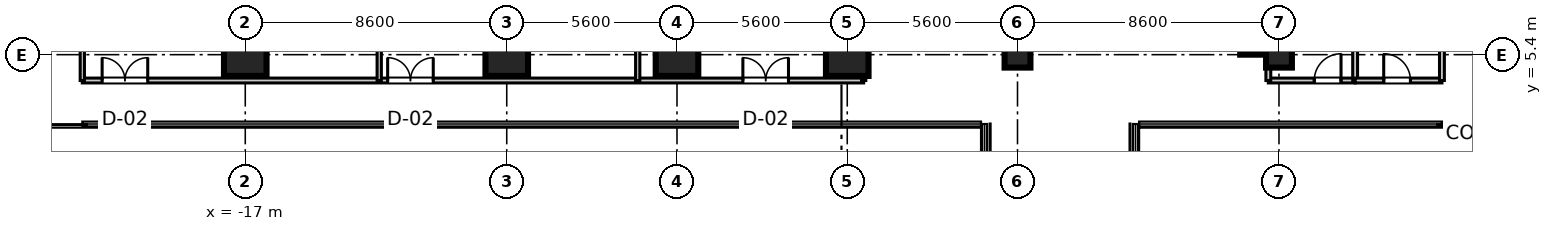
"""IFC4 building model, lengths in metres.
Left out: names, types, materials, properties, quantities, classifications, styles, units other than length and angle.
Written with IfcOpenShell. Run it as: python <this file> out.ifc"""

import sys

from ifc_helpers import new_model, si_unit, direction, frame, frame_2d, origin, origin_2d, place, context, subcontext, project, spatial, rectangle, extrude, source, transform, mapped, element, fill, save


model = new_model("IFC4")
c1 = context("Model", 3, precision=1e-05, world=origin(), true_north=direction((0.0, 1.0)))
c2 = subcontext(c1, "Body", "Model", "MODEL_VIEW")
j1 = project(units=[si_unit("LENGTHUNIT", "METRE"), si_unit("PLANEANGLEUNIT", "RADIAN")], contexts=[c1])
p1 = place(None, origin())
s1 = spatial("IfcSite", under=j1, at=p1, CompositionType="ELEMENT")
p2 = place(p1, origin())
s2 = spatial("IfcBuilding", under=s1, at=p2, CompositionType="ELEMENT")
p3 = place(p2, frame((0.0, 0.0, 68.9)))
s3 = spatial("IfcBuildingStorey", under=s2, at=p3, CompositionType="ELEMENT", Elevation=68.9)
m1 = source(origin(), c2, "Body", "SweptSolid", [
    extrude(rectangle(XDim=1.4, YDim=1.4, at=origin_2d()), origin(), (0.0, 0.0, 1.0), 3.605),
])
for number, where, z_axis, x_axis in (
    (1, (-17.0, 5.4, 0.0), (0.0, 0.0, 1.0), (1.0, 0.0, 0.0)),
    (2, (-8.4, 5.4, 0.0), (0.0, 0.0, 1.0), (1.0, 0.0, 0.0)),
    (3, (-2.8, 5.4, 0.0), (0.0, 0.0, 1.0), (1.0, 0.0, 0.0)),
    (4, (2.8, 5.4, 0.0), (0.0, 0.0, 1.0), (1.0, 0.0, 0.0)),
):
    element("IfcColumn", number, at=place(p3, frame(where, z_axis=z_axis, x_axis=x_axis)), inside=s3, PredefinedType="COLUMN", context=c2, shape_type="MappedRepresentation", body=[
        mapped(m1, transform((0.0, 0.0, 0.0), scale=1.0)),
    ])
m2 = source(origin(), c2, "Body", "SweptSolid", [
    extrude(rectangle(XDim=0.85, YDim=0.85, at=origin_2d()), origin(), (0.0, 0.0, 1.0), 3.605),
])
for number, where, z_axis, x_axis in (
    (5, (8.4, 5.4, 0.0), (0.0, 0.0, 1.0), (1.0, 0.0, 0.0)),
    (6, (17.0, 5.4, 0.0), (0.0, 0.0, 1.0), (1.0, 0.0, 0.0)),
):
    element("IfcColumn", number, at=place(p3, frame(where, z_axis=z_axis, x_axis=x_axis)), inside=s3, PredefinedType="PILASTER", context=c2, shape_type="MappedRepresentation", body=[
        mapped(m2, transform((0.0, 0.0, 0.0), scale=1.0)),
    ])
m3 = source(origin(), c2, "Body", "SweptSolid", [
    extrude(rectangle(XDim=11.6, YDim=0.65, at=frame_2d((5.8, 0.0))), origin(), (0.0, 0.0, 1.0), 3.37),
])
p4 = place(p3, frame((16.05, 5.4, 0.0), z_axis=(0.0, 0.0, 1.0), x_axis=(0.0, 1.0, 0.0)))
e7 = element("IfcWall", 7, at=p4, inside=s3, PredefinedType="SHEAR", context=c2, shape_type="MappedRepresentation", body=[
    mapped(m3, transform((0.0, 0.0, 0.0), scale=1.0)),
])
m4 = source(origin(), c2, "Body", "SweptSolid", [
    extrude(rectangle(XDim=2.855, YDim=0.16, at=frame_2d((1.427, 0.0))), origin(), (0.0, 0.0, 1.0), 2.71),
])
p5 = place(p3, frame((16.65, 4.55, 0.0), z_axis=(0.0, 0.0, 1.0), x_axis=(1.0, 0.0, 0.0)))
e8 = element("IfcWall", 8, at=p5, inside=s3, PredefinedType="PARTITIONING", context=c2, shape_type="MappedRepresentation", body=[
    mapped(m4, transform((0.0, 0.0, 0.0), scale=1.0)),
])
p6 = place(p5, frame((1.511, 0.0, 0.0)))
e9 = element("IfcOpeningElement", 9, at=p6, cuts=e8, PredefinedType="OPENING", context=c2, shape_type="SweptSolid", body=[
    extrude(rectangle(XDim=0.88, YDim=2.1, at=frame_2d((0.44, 1.05))), frame((0.0, 0.09, 0.0), z_axis=(0.0, -1.0, 0.0), x_axis=(1.0, 0.0, 0.0)), (0.0, 0.0, 1.0), 0.18),
])
m5 = source(origin(), c2, "Body", "SweptSolid", [
    extrude(rectangle(XDim=20.55, YDim=0.16, at=frame_2d((10.275, 0.0))), origin(), (0.0, 0.0, 1.0), 2.71),
])
for number, where, z_axis, x_axis in (
    (10, (16.65, 4.55, 0.0), (0.0, 0.0, 1.0), (0.0, 1.0, 0.0)),
    (11, (19.505, 4.55, 0.0), (0.0, 0.0, 1.0), (0.0, 1.0, 0.0)),
):
    element("IfcWall", number, at=place(p3, frame(where, z_axis=z_axis, x_axis=x_axis)), inside=s3, PredefinedType="PARTITIONING", context=c2, shape_type="MappedRepresentation", body=[
        mapped(m5, transform((0.0, 0.0, 0.0), scale=1.0)),
    ])
m6 = source(origin(), c2, "Body", "SweptSolid", [
    extrude(rectangle(XDim=2.855, YDim=0.16, at=frame_2d((1.428, 0.0))), origin(), (0.0, 0.0, 1.0), 2.71),
])
p7 = place(p3, frame((19.505, 4.55, 0.0), z_axis=(0.0, 0.0, 1.0), x_axis=(1.0, 0.0, 0.0)))
e12 = element("IfcWall", 12, at=p7, inside=s3, PredefinedType="PARTITIONING", context=c2, shape_type="MappedRepresentation", body=[
    mapped(m6, transform((0.0, 0.0, 0.0), scale=1.0)),
])
p8 = place(p7, frame((0.94, 0.0, 0.0)))
e13 = element("IfcOpeningElement", 13, at=p8, cuts=e12, PredefinedType="OPENING", context=c2, shape_type="SweptSolid", body=[
    extrude(rectangle(XDim=0.88, YDim=2.1, at=frame_2d((0.44, 1.05))), frame((0.0, 0.09, 0.0), z_axis=(0.0, -1.0, 0.0), x_axis=(1.0, 0.0, 0.0)), (0.0, 0.0, 1.0), 0.18),
])
m7 = source(origin(), c2, "Body", "SweptSolid", [
    extrude(rectangle(XDim=19.13, YDim=0.16, at=frame_2d((9.565, 0.0))), origin(), (0.0, 0.0, 1.0), 2.71),
])
p9 = place(p3, frame((22.36, 4.55, 0.0), z_axis=(0.0, 0.0, 1.0), x_axis=(0.0, 1.0, 0.0)))
e14 = element("IfcWall", 14, at=p9, inside=s3, PredefinedType="PARTITIONING", context=c2, shape_type="MappedRepresentation", body=[
    mapped(m7, transform((0.0, 0.0, 0.0), scale=1.0)),
])
m8 = source(origin(), c2, "Body", "SweptSolid", [
    extrude(rectangle(XDim=25.7, YDim=0.16, at=frame_2d((12.85, 0.0))), origin(), (0.0, 0.0, 1.0), 2.71),
])
p10 = place(p3, frame((-22.36, 4.55, 0.0), z_axis=(0.0, 0.0, 1.0), x_axis=(1.0, 0.0, 0.0)))
e15 = element("IfcWall", 15, at=p10, inside=s3, PredefinedType="PARTITIONING", context=c2, shape_type="MappedRepresentation", body=[
    mapped(m8, transform((0.0, 0.0, 0.0), scale=1.0)),
])
p11 = place(p10, frame((0.652, 0.0, 0.0)))
e16 = element("IfcOpeningElement", 16, at=p11, cuts=e15, PredefinedType="OPENING", context=c2, shape_type="SweptSolid", body=[
    extrude(rectangle(XDim=1.5, YDim=2.15, at=frame_2d((0.75, 1.075))), frame((0.0, 0.09, 0.0), z_axis=(0.0, -1.0, 0.0), x_axis=(1.0, 0.0, 0.0)), (0.0, 0.0, 1.0), 0.18),
])
p12 = place(p10, frame((10.043, 0.0, 0.0)))
e17 = element("IfcOpeningElement", 17, at=p12, cuts=e15, PredefinedType="OPENING", context=c2, shape_type="SweptSolid", body=[
    extrude(rectangle(XDim=1.5, YDim=2.15, at=frame_2d((0.75, 1.075))), frame((0.0, 0.09, 0.0), z_axis=(0.0, -1.0, 0.0), x_axis=(1.0, 0.0, 0.0)), (0.0, 0.0, 1.0), 0.18),
])
p13 = place(p10, frame((21.727, 0.0, 0.0)))
e18 = element("IfcOpeningElement", 18, at=p13, cuts=e15, PredefinedType="OPENING", context=c2, shape_type="SweptSolid", body=[
    extrude(rectangle(XDim=1.5, YDim=2.15, at=frame_2d((0.75, 1.075))), frame((0.0, 0.09, 0.0), z_axis=(0.0, -1.0, 0.0), x_axis=(1.0, 0.0, 0.0)), (0.0, 0.0, 1.0), 0.18),
])
m9 = source(origin(), c2, "Body", "SweptSolid", [
    extrude(rectangle(XDim=19.13, YDim=0.14, at=frame_2d((9.565, 0.0))), origin(), (0.0, 0.0, 1.0), 2.71),
])
p14 = place(p3, frame((-22.36, 4.55, 0.0), z_axis=(0.0, 0.0, 1.0), x_axis=(0.0, 1.0, 0.0)))
e19 = element("IfcWall", 19, at=p14, inside=s3, PredefinedType="PARTITIONING", context=c2, shape_type="MappedRepresentation", body=[
    mapped(m9, transform((0.0, 0.0, 0.0), scale=1.0)),
])
m10 = source(origin(), c2, "Body", "SweptSolid", [
    extrude(rectangle(XDim=20.55, YDim=0.14, at=frame_2d((10.275, 0.0))), origin(), (0.0, 0.0, 1.0), 2.71),
])
for number, where, z_axis, x_axis in (
    (20, (3.34, 4.55, 0.0), (0.0, 0.0, 1.0), (0.0, 1.0, 0.0)),
    (21, (-12.594, 4.55, 0.0), (0.0, 0.0, 1.0), (0.0, 1.0, 0.0)),
    (22, (-4.092, 4.55, 0.0), (0.0, 0.0, 1.0), (0.0, 1.0, 0.0)),
):
    element("IfcWall", number, at=place(p3, frame(where, z_axis=z_axis, x_axis=x_axis)), inside=s3, PredefinedType="PARTITIONING", context=c2, shape_type="MappedRepresentation", body=[
        mapped(m10, transform((0.0, 0.0, 0.0), scale=1.0)),
    ])
m11 = source(origin(), c2, "Body", "SweptSolid", [
    extrude(rectangle(XDim=0.88, YDim=2.1, at=frame_2d((0.44, 1.05))), frame((0.0, 0.025, 0.0), z_axis=(0.0, -1.0, 0.0), x_axis=(1.0, 0.0, 0.0)), (0.0, 0.0, 1.0), 0.05),
])
p15 = place(p6, origin())
e23 = element("IfcDoor", 23, at=p15, inside=s3, OperationType="SINGLE_SWING_RIGHT", PredefinedType="DOOR", context=c2, shape_type="MappedRepresentation", body=[
    mapped(m11, transform((0.0, 0.0, 0.0), scale=1.0)),
])
fill(e9, e23)
p16 = place(p8, origin())
e24 = element("IfcDoor", 24, at=p16, inside=s3, OperationType="SINGLE_SWING_LEFT", PredefinedType="DOOR", context=c2, shape_type="MappedRepresentation", body=[
    mapped(m11, transform((0.0, 0.0, 0.0), scale=1.0)),
])
fill(e13, e24)
m12 = source(origin(), c2, "Body", "SweptSolid", [
    extrude(rectangle(XDim=1.5, YDim=2.15, at=frame_2d((0.75, 1.075))), frame((0.0, 0.025, 0.0), z_axis=(0.0, -1.0, 0.0), x_axis=(1.0, 0.0, 0.0)), (0.0, 0.0, 1.0), 0.05),
])
p17 = place(p11, origin())
e25 = element("IfcDoor", 25, at=p17, inside=s3, OperationType="DOUBLE_DOOR_SINGLE_SWING", PredefinedType="DOOR", context=c2, shape_type="MappedRepresentation", body=[
    mapped(m12, transform((0.0, 0.0, 0.0), scale=1.0)),
])
fill(e16, e25)
p18 = place(p12, origin())
e26 = element("IfcDoor", 26, at=p18, inside=s3, OperationType="DOUBLE_DOOR_SINGLE_SWING", PredefinedType="DOOR", context=c2, shape_type="MappedRepresentation", body=[
    mapped(m12, transform((0.0, 0.0, 0.0), scale=1.0)),
])
fill(e17, e26)
p19 = place(p13, origin())
e27 = element("IfcDoor", 27, at=p19, inside=s3, OperationType="DOUBLE_DOOR_SINGLE_SWING", PredefinedType="DOOR", context=c2, shape_type="MappedRepresentation", body=[
    mapped(m12, transform((0.0, 0.0, 0.0), scale=1.0)),
])
fill(e18, e27)
save(model, sys.argv[1])
